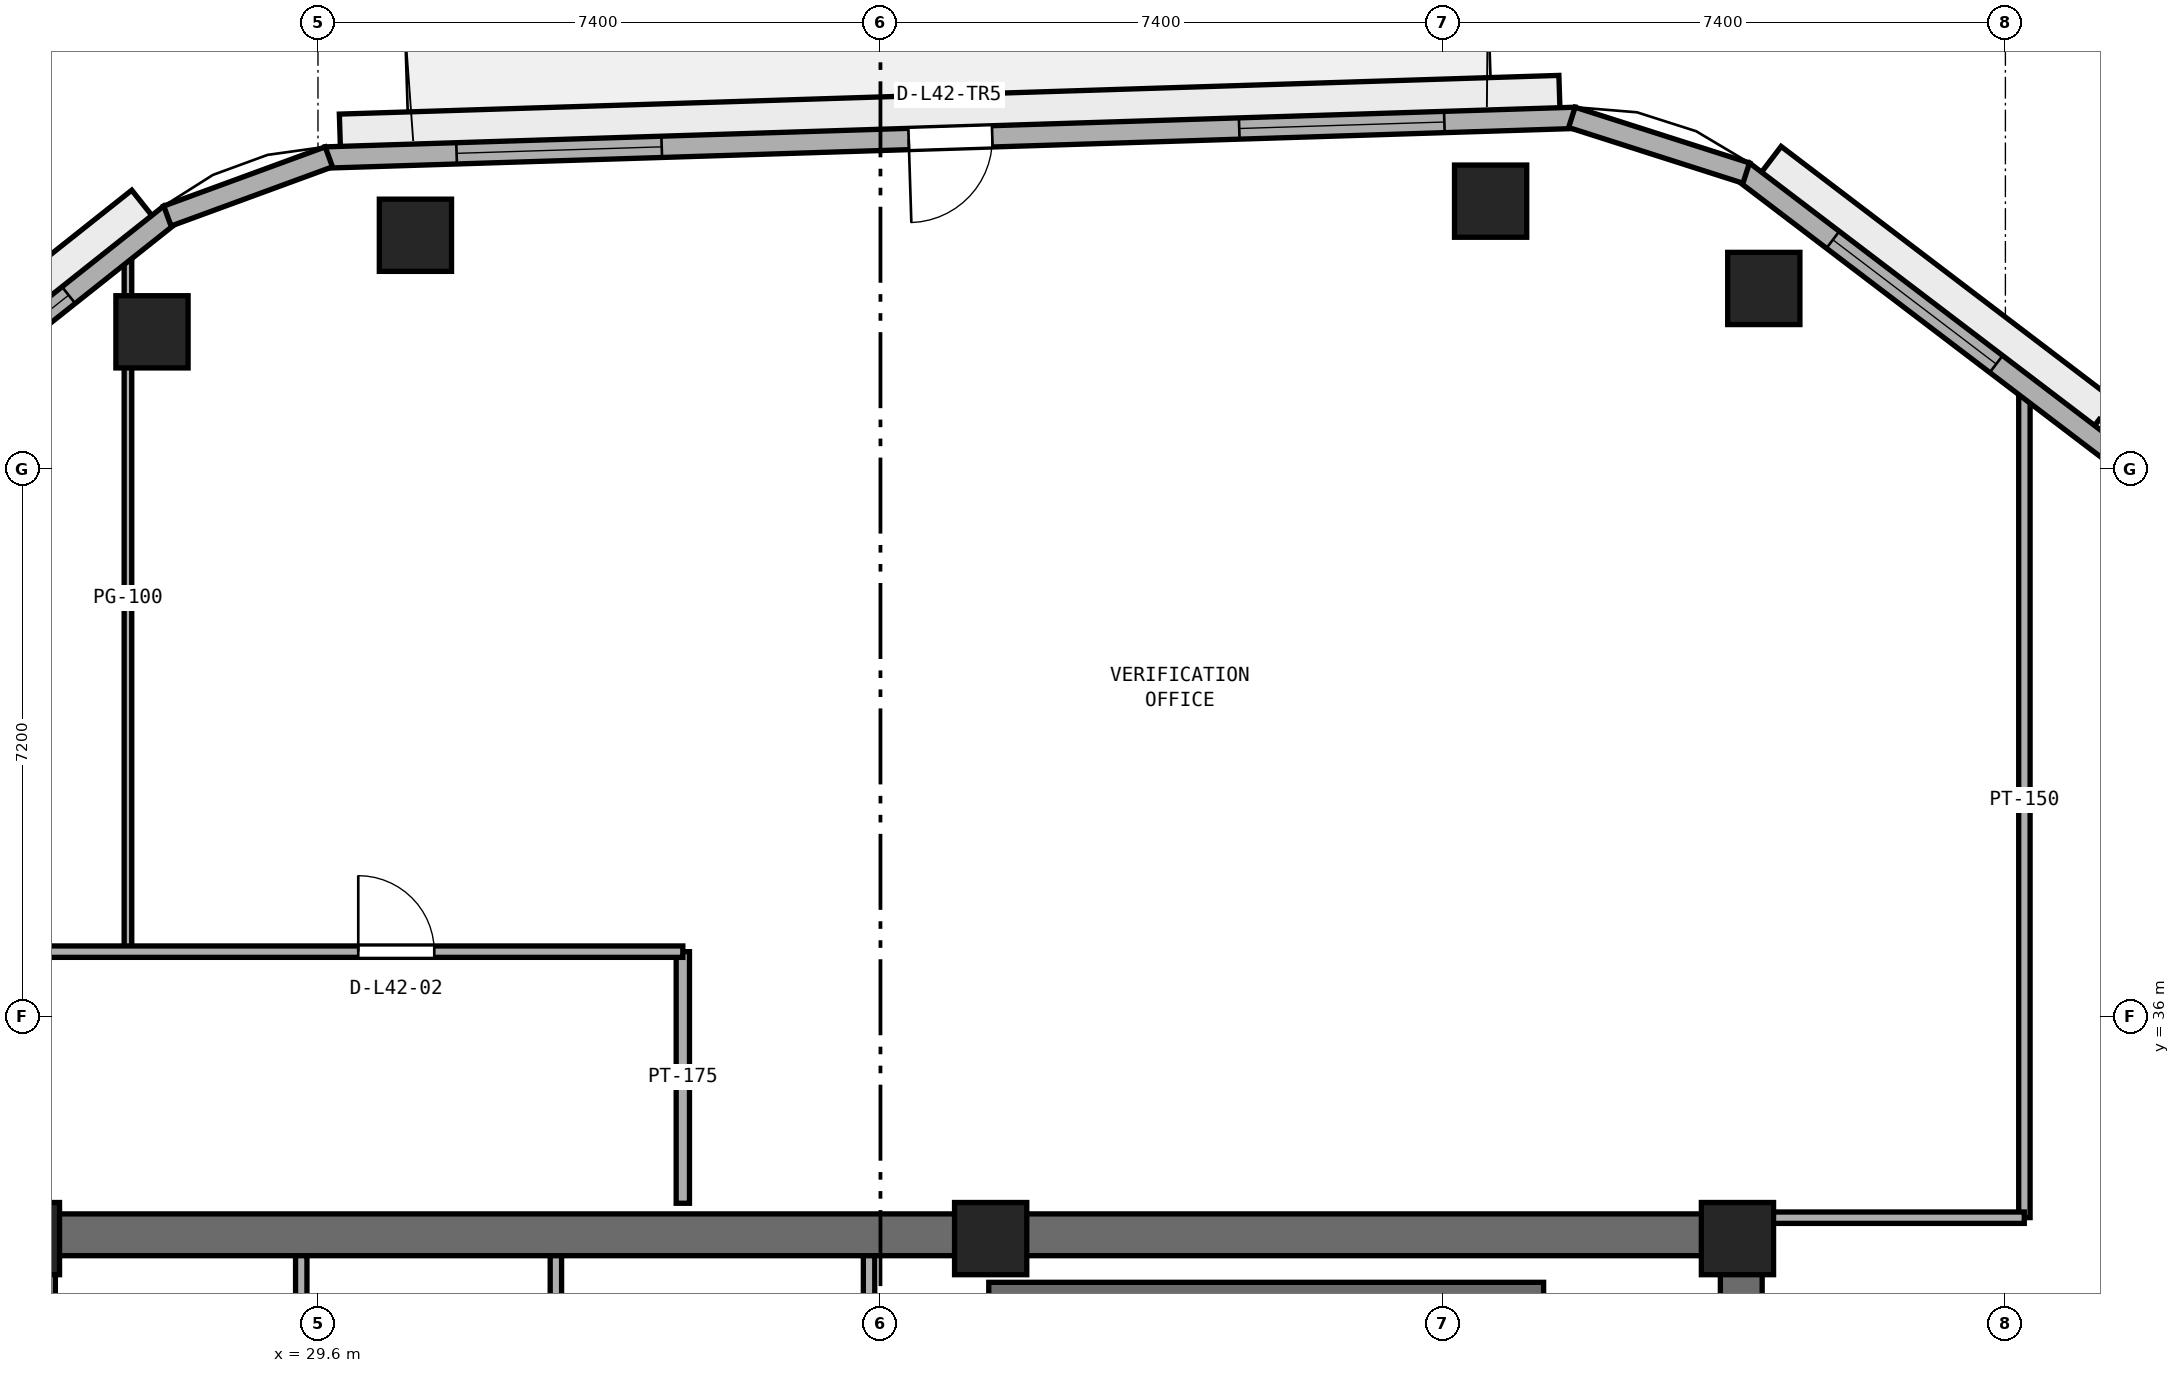
"""IFC4 building model, lengths in metres.
Left out: names, types, materials, properties, quantities, classifications, styles, units other than length and angle.
Written with IfcOpenShell. Run it as: python <this file> out.ifc"""

import sys

from ifc_helpers import new_model, si_unit, direction, frame, frame_2d, origin, origin_2d, place, context, subcontext, project, spatial, rectangle, extrude, element, fill, save


model = new_model("IFC4")
c1 = context("Model", 3, precision=1e-05, world=origin(), true_north=direction((0.0, 1.0)))
c2 = subcontext(c1, "Body", "Model", "MODEL_VIEW")
j1 = project(units=[si_unit("LENGTHUNIT", "METRE"), si_unit("PLANEANGLEUNIT", "RADIAN")], contexts=[c1])
p1 = place(None, origin())
s1 = spatial("IfcSite", under=j1, at=p1, CompositionType="ELEMENT")
p2 = place(p1, origin())
s2 = spatial("IfcBuilding", under=s1, at=p2, CompositionType="ELEMENT")
p3 = place(p2, frame((0.0, 0.0, 166.8)))
s3 = spatial("IfcBuildingStorey", under=s2, at=p3, CompositionType="ELEMENT", Elevation=166.8)
p4 = place(p3, frame((25.4, 33.125, 0.0), z_axis=(0.0, 0.0, 1.0), x_axis=(1.0, 0.0, 0.0)))
e1 = element("IfcWall", 1, at=p4, inside=s3, PredefinedType="SHEAR", context=c2, shape_type="SweptSolid", body=[
    extrude(rectangle(XDim=23.2, YDim=0.55, at=frame_2d((11.6, 0.0))), origin(), (0.0, 0.0, 1.0), 3.54),
])
p5 = place(p3, frame((48.325, 17.55, 0.0), z_axis=(0.0, 0.0, 1.0), x_axis=(0.0, 1.0, 0.0)))
e2 = element("IfcWall", 2, at=p5, inside=s3, PredefinedType="SHEAR", context=c2, shape_type="SweptSolid", body=[
    extrude(rectangle(XDim=15.3, YDim=0.55, at=frame_2d((7.65, 0.0))), origin(), (0.0, 0.0, 1.0), 3.54),
])
p6 = place(p5, frame((5.75, 0.0, 0.0)))
e3 = element("IfcOpeningElement", 3, at=p6, cuts=e2, PredefinedType="OPENING", context=c2, shape_type="SweptSolid", body=[
    extrude(rectangle(XDim=1.5, YDim=2.15, at=frame_2d((0.75, 1.075))), frame((0.0, 0.285, 0.0), z_axis=(0.0, -1.0, 0.0), x_axis=(1.0, 0.0, 0.0)), (0.0, 0.0, 1.0), 0.57),
])
for number, where, z_axis, x_axis in (
    (4, (48.275, 33.075, 0.0), (0.0, 0.0, 1.0), (1.0, 0.0, 0.0)),
    (5, (38.45, 33.075, 0.0), (0.0, 0.0, 1.0), (1.0, 0.0, 0.0)),
    (6, (25.725, 33.075, 0.0), (0.0, 0.0, 1.0), (1.0, 0.0, 0.0)),
):
    element("IfcColumn", number, at=place(p3, frame(where, z_axis=z_axis, x_axis=x_axis)), inside=s3, PredefinedType="PILASTER", context=c2, shape_type="SweptSolid", body=[
        extrude(rectangle(XDim=0.95, YDim=0.95, at=origin_2d()), origin(), (0.0, 0.0, 1.0), 3.8),
    ])
for number, where, z_axis, x_axis in (
    (7, (48.622, 45.575, 0.0), (0.0, 0.0, 1.0), (1.0, 0.0, 0.0)),
    (8, (45.028, 46.724, 0.0), (0.0, 0.0, 1.0), (1.0, 0.0, 0.0)),
    (9, (30.882, 46.275, 0.0), (0.0, 0.0, 1.0), (1.0, 0.0, 0.0)),
    (10, (27.416, 45.004, 0.0), (0.0, 0.0, 1.0), (1.0, 0.0, 0.0)),
):
    element("IfcColumn", number, at=place(p3, frame(where, z_axis=z_axis, x_axis=x_axis)), inside=s3, PredefinedType="COLUMN", context=c2, shape_type="SweptSolid", body=[
        extrude(rectangle(XDim=0.95, YDim=0.95, at=origin_2d()), origin(), (0.0, 0.0, 1.0), 3.8),
    ])
p7 = place(p3, frame((38.425, 32.375, 0.0), z_axis=(0.0, 0.0, 1.0), x_axis=(1.0, 0.0, 0.0)))
e11 = element("IfcWall", 11, at=p7, inside=s3, PredefinedType="SHEAR", context=c2, shape_type="SweptSolid", body=[
    extrude(rectangle(XDim=7.3, YDim=0.25, at=frame_2d((3.65, 0.0))), origin(), (0.0, 0.0, 1.0), 3.54),
])
p8 = place(p3, frame((26.07, 30.65, 0.0), z_axis=(0.0, 0.0, 1.0), x_axis=(0.0, 1.0, 0.0)))
e12 = element("IfcWall", 12, at=p8, inside=s3, PredefinedType="PARTITIONING", context=c2, shape_type="SweptSolid", body=[
    extrude(rectangle(XDim=2.2, YDim=0.15, at=frame_2d((1.1, 0.0))), origin(), (0.0, 0.0, 1.0), 2.64),
])
for number, where, z_axis, x_axis in (
    (13, (29.38, 30.65, 0.0), (0.0, 0.0, 1.0), (0.0, 1.0, 0.0)),
    (14, (32.73, 30.65, 0.0), (0.0, 0.0, 1.0), (0.0, 1.0, 0.0)),
    (15, (36.85, 30.65, 0.0), (0.0, 0.0, 1.0), (0.0, 1.0, 0.0)),
):
    element("IfcWall", number, at=place(p3, frame(where, z_axis=z_axis, x_axis=x_axis)), inside=s3, PredefinedType="PARTITIONING", context=c2, shape_type="SweptSolid", body=[
        extrude(rectangle(XDim=2.2, YDim=0.15, at=frame_2d((1.1, 0.0))), origin(), (0.0, 0.0, 1.0), 3.54),
    ])
p9 = place(p3, frame((52.05, 33.352, 0.0), z_axis=(0.0, 0.0, 1.0), x_axis=(0.0, 1.0, 0.0)))
e16 = element("IfcWall", 16, at=p9, inside=s3, PredefinedType="PARTITIONING", context=c2, shape_type="SweptSolid", body=[
    extrude(rectangle(XDim=10.983, YDim=0.15, at=frame_2d((5.491, 0.0))), origin(), (0.0, 0.0, 1.0), 3.54),
])
p10 = place(p3, frame((34.4, 33.54, 0.0), z_axis=(0.0, 0.0, 1.0), x_axis=(0.0, 1.0, 0.0)))
e17 = element("IfcWall", 17, at=p10, inside=s3, PredefinedType="PARTITIONING", context=c2, shape_type="SweptSolid", body=[
    extrude(rectangle(XDim=3.31, YDim=0.175, at=frame_2d((1.655, 0.0))), origin(), (0.0, 0.0, 1.0), 3.54),
])
p11 = place(p3, frame((27.1, 36.85, 0.0), z_axis=(0.0, 0.0, 1.0), x_axis=(0.0, 1.0, 0.0)))
e18 = element("IfcWall", 18, at=p11, inside=s3, PredefinedType="PARTITIONING", context=c2, shape_type="SweptSolid", body=[
    extrude(rectangle(XDim=9.295, YDim=0.1, at=frame_2d((4.648, 0.0))), origin(), (0.0, 0.0, 1.0), 3.54),
])
p12 = place(p3, frame((48.74, 33.35, 0.0), z_axis=(0.0, 0.0, 1.0), x_axis=(1.0, 0.0, 0.0)))
e19 = element("IfcWall", 19, at=p12, inside=s3, PredefinedType="PARTITIONING", context=c2, shape_type="SweptSolid", body=[
    extrude(rectangle(XDim=3.309, YDim=0.15, at=frame_2d((1.654, 0.0))), origin(), (0.0, 0.0, 1.0), 2.923),
])
p13 = place(p3, frame((21.95, 36.85, 0.0), z_axis=(0.0, 0.0, 1.0), x_axis=(1.0, 0.0, 0.0)))
e20 = element("IfcWall", 20, at=p13, inside=s3, PredefinedType="PARTITIONING", context=c2, shape_type="SweptSolid", body=[
    extrude(rectangle(XDim=12.45, YDim=0.15, at=frame_2d((6.225, 0.0))), origin(), (0.0, 0.0, 1.0), 3.54),
])
p14 = place(p13, frame((2.195, 0.0, 0.0)))
e21 = element("IfcOpeningElement", 21, at=p14, cuts=e20, PredefinedType="OPENING", context=c2, shape_type="SweptSolid", body=[
    extrude(rectangle(XDim=1.0, YDim=2.12, at=frame_2d((0.5, 1.06))), frame((0.0, 0.085, 0.0), z_axis=(0.0, -1.0, 0.0), x_axis=(1.0, 0.0, 0.0)), (0.0, 0.0, 1.0), 0.17),
])
p15 = place(p13, frame((8.18, 0.0, 0.0)))
e22 = element("IfcOpeningElement", 22, at=p15, cuts=e20, PredefinedType="OPENING", context=c2, shape_type="SweptSolid", body=[
    extrude(rectangle(XDim=1.0, YDim=2.12, at=frame_2d((0.5, 1.06))), frame((0.0, 0.085, 0.0), z_axis=(0.0, -1.0, 0.0), x_axis=(1.0, 0.0, 0.0)), (0.0, 0.0, 1.0), 0.17),
])
p16 = place(p3, frame((60.295, 38.025, 0.0), z_axis=(0.0, 0.0, 1.0), x_axis=(-0.795831760834, 0.605517801925, 0.0)))
e23 = element("IfcWall", 23, at=p16, inside=s3, PredefinedType="STANDARD", context=c2, shape_type="SweptSolid", body=[
    extrude(rectangle(XDim=15.012, YDim=0.28, at=frame_2d((7.506, 0.0))), origin(), (0.0, 0.0, 1.0), 3.54),
])
p17 = place(p16, frame((1.485, 0.0, 0.9)))
e24 = element("IfcOpeningElement", 24, at=p17, cuts=e23, PredefinedType="OPENING", context=c2, shape_type="SweptSolid", body=[
    extrude(rectangle(XDim=2.7, YDim=1.75, at=frame_2d((1.35, 0.875))), frame((0.0, 0.15, 0.0), z_axis=(0.0, -1.0, 0.0), x_axis=(1.0, 0.0, 0.0)), (0.0, 0.0, 1.0), 0.3),
])
p18 = place(p16, frame((6.156, 0.0, 0.9)))
e25 = element("IfcOpeningElement", 25, at=p18, cuts=e23, PredefinedType="OPENING", context=c2, shape_type="SweptSolid", body=[
    extrude(rectangle(XDim=2.7, YDim=1.75, at=frame_2d((1.35, 0.875))), frame((0.0, 0.15, 0.0), z_axis=(0.0, -1.0, 0.0), x_axis=(1.0, 0.0, 0.0)), (0.0, 0.0, 1.0), 0.3),
])
p19 = place(p16, frame((10.826, 0.0, 0.9)))
e26 = element("IfcOpeningElement", 26, at=p19, cuts=e23, PredefinedType="OPENING", context=c2, shape_type="SweptSolid", body=[
    extrude(rectangle(XDim=2.7, YDim=1.75, at=frame_2d((1.35, 0.875))), frame((0.0, 0.15, 0.0), z_axis=(0.0, -1.0, 0.0), x_axis=(1.0, 0.0, 0.0)), (0.0, 0.0, 1.0), 0.3),
])
p20 = place(p3, frame((46.143, 47.82, 0.0), z_axis=(0.0, 0.0, 1.0), x_axis=(-0.999497065256, -0.031711457627, 0.0)))
e27 = element("IfcWall", 27, at=p20, inside=s3, PredefinedType="STANDARD", context=c2, shape_type="SweptSolid", body=[
    extrude(rectangle(XDim=16.452, YDim=0.28, at=frame_2d((8.226, 0.0))), origin(), (0.0, 0.0, 1.0), 3.54),
])
p21 = place(p20, frame((7.676, 0.0, 0.0)))
e28 = element("IfcOpeningElement", 28, at=p21, cuts=e27, PredefinedType="OPENING", context=c2, shape_type="SweptSolid", body=[
    extrude(rectangle(XDim=1.1, YDim=2.2, at=frame_2d((0.55, 1.1))), frame((0.0, 0.15, 0.0), z_axis=(0.0, -1.0, 0.0), x_axis=(1.0, 0.0, 0.0)), (0.0, 0.0, 1.0), 0.3),
])
p22 = place(p20, frame((1.725, 0.0, 0.9)))
e29 = element("IfcOpeningElement", 29, at=p22, cuts=e27, PredefinedType="OPENING", context=c2, shape_type="SweptSolid", body=[
    extrude(rectangle(XDim=2.7, YDim=1.75, at=frame_2d((1.35, 0.875))), frame((0.0, 0.15, 0.0), z_axis=(0.0, -1.0, 0.0), x_axis=(1.0, 0.0, 0.0)), (0.0, 0.0, 1.0), 0.3),
])
p23 = place(p20, frame((12.027, 0.0, 0.9)))
e30 = element("IfcOpeningElement", 30, at=p23, cuts=e27, PredefinedType="OPENING", context=c2, shape_type="SweptSolid", body=[
    extrude(rectangle(XDim=2.7, YDim=1.75, at=frame_2d((1.35, 0.875))), frame((0.0, 0.15, 0.0), z_axis=(0.0, -1.0, 0.0), x_axis=(1.0, 0.0, 0.0)), (0.0, 0.0, 1.0), 0.3),
])
p24 = place(p3, frame((27.658, 46.55, 0.0), z_axis=(0.0, 0.0, 1.0), x_axis=(-0.783266285861, -0.621686356158, 0.0)))
e31 = element("IfcWall", 31, at=p24, inside=s3, PredefinedType="STANDARD", context=c2, shape_type="SweptSolid", body=[
    extrude(rectangle(XDim=16.353, YDim=0.28, at=frame_2d((8.177, 0.0))), origin(), (0.0, 0.0, 1.0), 3.54),
])
p25 = place(p24, frame((1.709, 0.0, 0.9)))
e32 = element("IfcOpeningElement", 32, at=p25, cuts=e31, PredefinedType="OPENING", context=c2, shape_type="SweptSolid", body=[
    extrude(rectangle(XDim=2.7, YDim=1.75, at=frame_2d((1.35, 0.875))), frame((0.0, 0.15, 0.0), z_axis=(0.0, -1.0, 0.0), x_axis=(1.0, 0.0, 0.0)), (0.0, 0.0, 1.0), 0.3),
])
p26 = place(p24, frame((6.826, 0.0, 0.9)))
e33 = element("IfcOpeningElement", 33, at=p26, cuts=e31, PredefinedType="OPENING", context=c2, shape_type="SweptSolid", body=[
    extrude(rectangle(XDim=2.7, YDim=1.75, at=frame_2d((1.35, 0.875))), frame((0.0, 0.15, 0.0), z_axis=(0.0, -1.0, 0.0), x_axis=(1.0, 0.0, 0.0)), (0.0, 0.0, 1.0), 0.3),
])
p27 = place(p24, frame((11.944, 0.0, 0.9)))
e34 = element("IfcOpeningElement", 34, at=p27, cuts=e31, PredefinedType="OPENING", context=c2, shape_type="SweptSolid", body=[
    extrude(rectangle(XDim=2.7, YDim=1.75, at=frame_2d((1.35, 0.875))), frame((0.0, 0.15, 0.0), z_axis=(0.0, -1.0, 0.0), x_axis=(1.0, 0.0, 0.0)), (0.0, 0.0, 1.0), 0.3),
])
p28 = place(p3, frame((48.39, 47.093, 0.0), z_axis=(0.0, 0.0, 1.0), x_axis=(-0.952542948918, 0.304404222156, 0.0)))
e35 = element("IfcWall", 35, at=p28, inside=s3, PredefinedType="STANDARD", context=c2, shape_type="SweptSolid", body=[
    extrude(rectangle(XDim=2.408, YDim=0.28, at=frame_2d((1.204, 0.0))), origin(), (0.0, 0.0, 1.0), 3.54),
])
p29 = place(p3, frame((29.743, 47.306, 0.0), z_axis=(0.0, 0.0, 1.0), x_axis=(-0.93893328381, -0.344099242302, 0.0)))
e36 = element("IfcWall", 36, at=p29, inside=s3, PredefinedType="STANDARD", context=c2, shape_type="SweptSolid", body=[
    extrude(rectangle(XDim=2.262, YDim=0.28, at=frame_2d((1.131, 0.0))), origin(), (0.0, 0.0, 1.0), 3.54),
])
p30 = place(p15, origin())
e37 = element("IfcDoor", 37, at=p30, inside=s3, OperationType="SINGLE_SWING_LEFT", PredefinedType="DOOR", context=c2, shape_type="SweptSolid", body=[
    extrude(rectangle(XDim=1.0, YDim=2.12, at=frame_2d((0.5, 1.06))), frame((0.0, 0.025, 0.0), z_axis=(0.0, -1.0, 0.0), x_axis=(1.0, 0.0, 0.0)), (0.0, 0.0, 1.0), 0.05),
])
fill(e22, e37)
p31 = place(p19, origin())
e38 = element("IfcWindow", 38, at=p31, inside=s3, PartitioningType="SINGLE_PANEL", PredefinedType="WINDOW", context=c2, shape_type="SweptSolid", body=[
    extrude(rectangle(XDim=2.7, YDim=1.75, at=frame_2d((1.35, 0.875))), frame((0.0, 0.03, 0.0), z_axis=(0.0, -1.0, 0.0), x_axis=(1.0, 0.0, 0.0)), (0.0, 0.0, 1.0), 0.06),
])
fill(e26, e38)
p32 = place(p21, origin())
e39 = element("IfcDoor", 39, at=p32, inside=s3, OperationType="SINGLE_SWING_RIGHT", PredefinedType="DOOR", context=c2, shape_type="SweptSolid", body=[
    extrude(rectangle(XDim=1.1, YDim=2.2, at=frame_2d((0.55, 1.1))), frame((0.0, 0.025, 0.0), z_axis=(0.0, -1.0, 0.0), x_axis=(1.0, 0.0, 0.0)), (0.0, 0.0, 1.0), 0.05),
])
fill(e28, e39)
p33 = place(p22, origin())
e40 = element("IfcWindow", 40, at=p33, inside=s3, PartitioningType="SINGLE_PANEL", PredefinedType="WINDOW", context=c2, shape_type="SweptSolid", body=[
    extrude(rectangle(XDim=2.7, YDim=1.75, at=frame_2d((1.35, 0.875))), frame((0.0, 0.03, 0.0), z_axis=(0.0, -1.0, 0.0), x_axis=(1.0, 0.0, 0.0)), (0.0, 0.0, 1.0), 0.06),
])
fill(e29, e40)
p34 = place(p23, origin())
e41 = element("IfcWindow", 41, at=p34, inside=s3, PartitioningType="SINGLE_PANEL", PredefinedType="WINDOW", context=c2, shape_type="SweptSolid", body=[
    extrude(rectangle(XDim=2.7, YDim=1.75, at=frame_2d((1.35, 0.875))), frame((0.0, 0.03, 0.0), z_axis=(0.0, -1.0, 0.0), x_axis=(1.0, 0.0, 0.0)), (0.0, 0.0, 1.0), 0.06),
])
fill(e30, e41)
p35 = place(p25, origin())
e42 = element("IfcWindow", 42, at=p35, inside=s3, PartitioningType="SINGLE_PANEL", PredefinedType="WINDOW", context=c2, shape_type="SweptSolid", body=[
    extrude(rectangle(XDim=2.7, YDim=1.75, at=frame_2d((1.35, 0.875))), frame((0.0, 0.03, 0.0), z_axis=(0.0, -1.0, 0.0), x_axis=(1.0, 0.0, 0.0)), (0.0, 0.0, 1.0), 0.06),
])
fill(e32, e42)
save(model, sys.argv[1])
